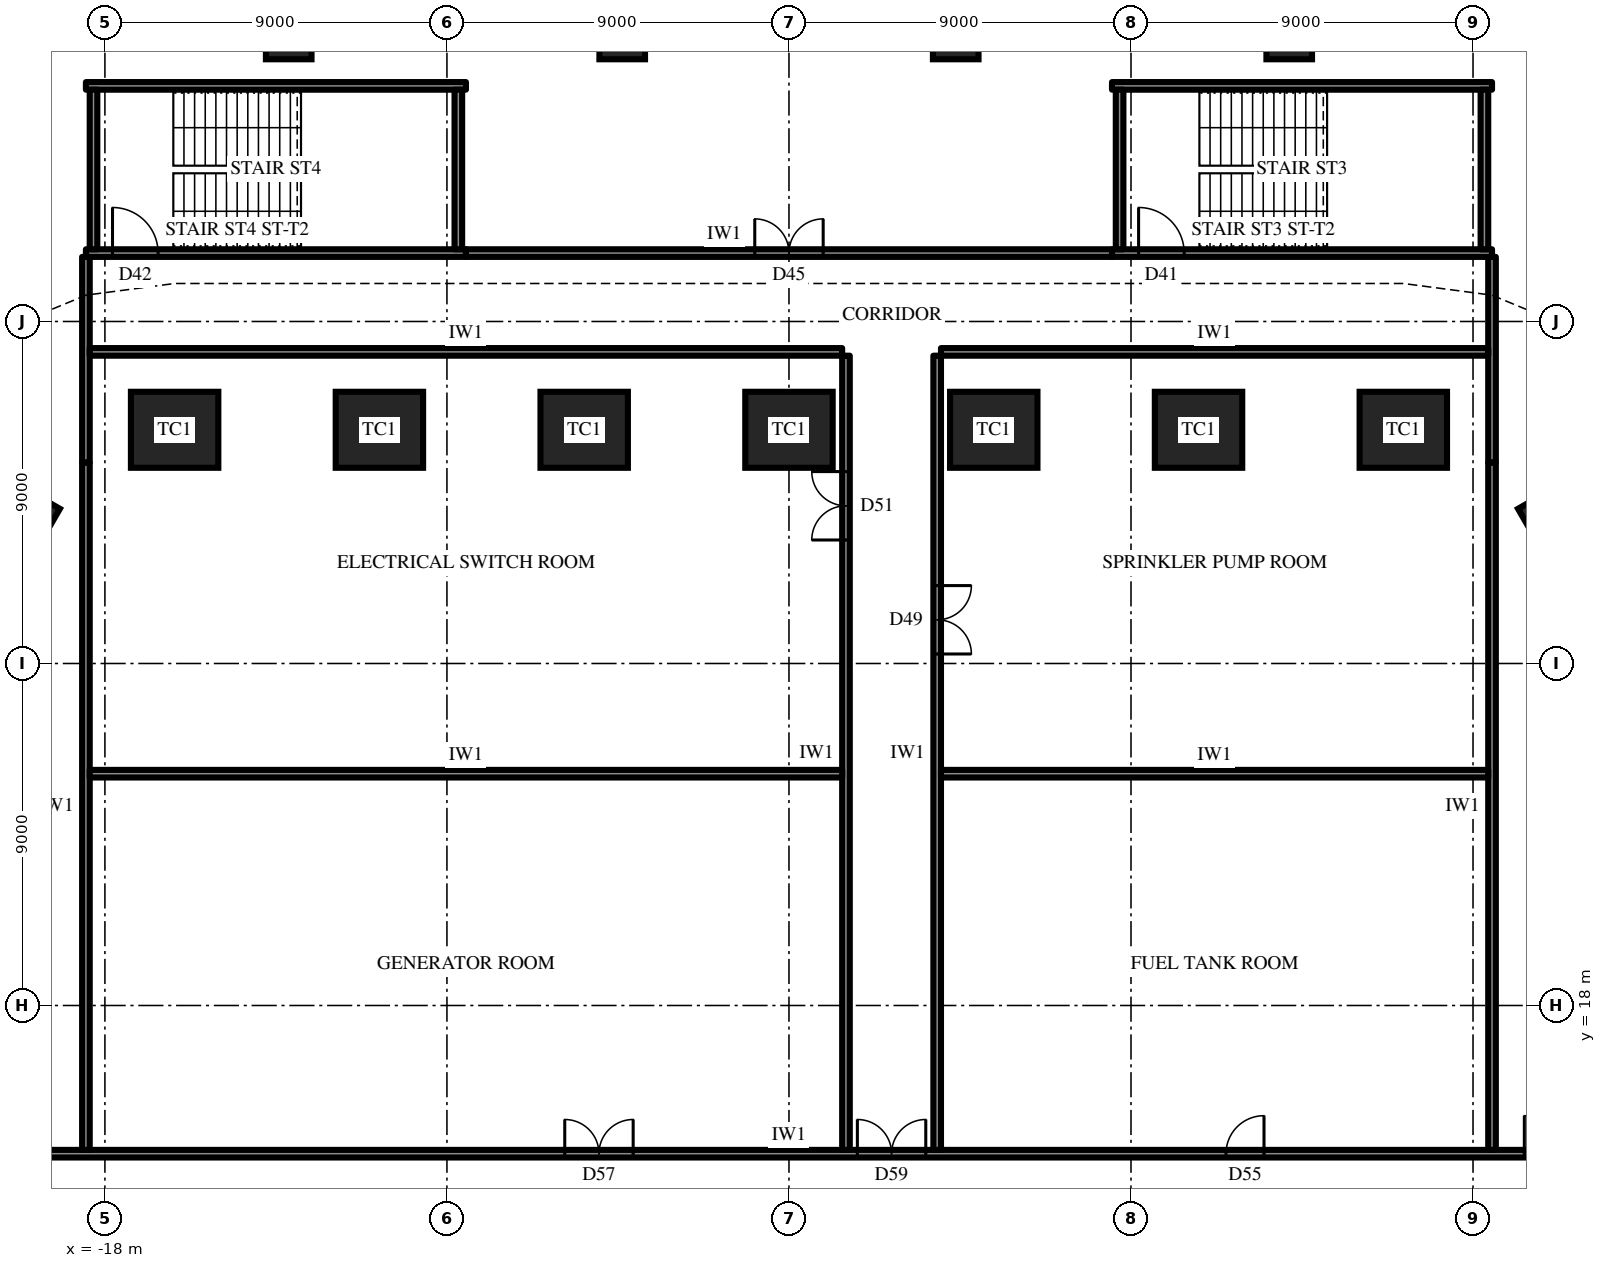
"""IFC4 building model, lengths in metres.
Left out: names, types, materials, properties, quantities, classifications, styles, units other than length and angle.
Written with IfcOpenShell. Run it as: python <this file> out.ifc"""

import sys

from ifc_helpers import new_model, si_unit, direction, frame, frame_2d, origin, origin_2d, place, context, subcontext, project, spatial, rectangle, extrude, element, fill, save


model = new_model("IFC4")
c1 = context("Model", 3, precision=1e-05, world=origin(), true_north=direction((0.0, 1.0)))
c2 = subcontext(c1, "Body", "Model", "MODEL_VIEW")
j1 = project(units=[si_unit("LENGTHUNIT", "METRE"), si_unit("PLANEANGLEUNIT", "RADIAN")], contexts=[c1])
p1 = place(None, origin())
s1 = spatial("IfcSite", under=j1, at=p1, CompositionType="ELEMENT")
p2 = place(p1, origin())
s2 = spatial("IfcBuilding", under=s1, at=p2, CompositionType="ELEMENT")
p3 = place(p2, frame((0.0, 0.0, -9.0)))
s3 = spatial("IfcBuildingStorey", under=s2, at=p3, CompositionType="ELEMENT", Elevation=-9.0)
for number, where, z_axis, x_axis in (
    (1, (20.626, 30.575, 0.0), (0.0, 0.0, 1.0), (-0.5, 0.866, 0.0)),
    (2, (16.166, 33.15, 0.0), (0.0, 0.0, 1.0), (-1.0, 0.0, 0.0)),
    (3, (10.777, 33.15, 0.0), (0.0, 0.0, 1.0), (-1.0, 0.0, 0.0)),
    (4, (5.389, 33.15, 0.0), (0.0, 0.0, 1.0), (-1.0, 0.0, 0.0)),
    (5, (0.0, 33.15, 0.0), (0.0, 0.0, 1.0), (-1.0, 0.0, 0.0)),
    (6, (-5.389, 33.15, 0.0), (0.0, 0.0, 1.0), (-1.0, 0.0, 0.0)),
    (7, (-10.777, 33.15, 0.0), (0.0, 0.0, 1.0), (-1.0, 0.0, 0.0)),
    (8, (-16.166, 33.15, 0.0), (0.0, 0.0, 1.0), (-1.0, 0.0, 0.0)),
    (9, (-20.626, 30.575, 0.0), (0.0, 0.0, 1.0), (-0.5, -0.866, 0.0)),
):
    element("IfcColumn", number, at=place(p3, frame(where, z_axis=z_axis, x_axis=x_axis)), inside=s3, PredefinedType="COLUMN", context=c2, shape_type="SweptSolid", body=[
        extrude(rectangle(XDim=2.3, YDim=2.0, at=origin_2d()), origin(), (0.0, 0.0, 1.0), 4.5),
    ])
p4 = place(p3, frame((8.5, 37.8, 0.0), z_axis=(0.0, 0.0, 1.0), x_axis=(1.0, 0.0, 0.0)))
e10 = element("IfcWall", 10, at=p4, inside=s3, PredefinedType="SHEAR", context=c2, shape_type="SweptSolid", body=[
    extrude(rectangle(XDim=10.0, YDim=0.2, at=frame_2d((5.0, 0.0))), origin(), (0.0, 0.0, 1.0), 4.5),
])
p5 = place(p4, frame((0.7, 0.0, 0.0)))
e11 = element("IfcOpeningElement", 11, at=p5, cuts=e10, PredefinedType="OPENING", context=c2, shape_type="SweptSolid", body=[
    extrude(rectangle(XDim=1.2, YDim=2.2, at=frame_2d((0.6, 1.1))), frame((0.0, 0.11, 0.0), z_axis=(0.0, -1.0, 0.0), x_axis=(1.0, 0.0, 0.0)), (0.0, 0.0, 1.0), 0.22),
])
p6 = place(p3, frame((18.5, 42.2, 0.0), z_axis=(0.0, 0.0, 1.0), x_axis=(-1.0, 0.0, 0.0)))
e12 = element("IfcWall", 12, at=p6, inside=s3, PredefinedType="SHEAR", context=c2, shape_type="SweptSolid", body=[
    extrude(rectangle(XDim=10.0, YDim=0.2, at=frame_2d((5.0, 0.0))), origin(), (0.0, 0.0, 1.0), 4.5),
])
for number, where, z_axis, x_axis in (
    (13, (8.7, 42.1, 0.0), (0.0, 0.0, 1.0), (0.0, -1.0, 0.0)),
    (14, (18.3, 37.9, 0.0), (0.0, 0.0, 1.0), (0.0, 1.0, 0.0)),
):
    element("IfcWall", number, at=place(p3, frame(where, z_axis=z_axis, x_axis=x_axis)), inside=s3, PredefinedType="SHEAR", context=c2, shape_type="SweptSolid", body=[
        extrude(rectangle(XDim=4.2, YDim=0.2, at=frame_2d((2.1, 0.0))), origin(), (0.0, 0.0, 1.0), 4.5),
    ])
p7 = place(p3, frame((-18.5, 37.8, 0.0), z_axis=(0.0, 0.0, 1.0), x_axis=(1.0, 0.0, 0.0)))
e15 = element("IfcWall", 15, at=p7, inside=s3, PredefinedType="SHEAR", context=c2, shape_type="SweptSolid", body=[
    extrude(rectangle(XDim=10.0, YDim=0.2, at=frame_2d((5.0, 0.0))), origin(), (0.0, 0.0, 1.0), 4.5),
])
p8 = place(p7, frame((0.7, 0.0, 0.0)))
e16 = element("IfcOpeningElement", 16, at=p8, cuts=e15, PredefinedType="OPENING", context=c2, shape_type="SweptSolid", body=[
    extrude(rectangle(XDim=1.2, YDim=2.2, at=frame_2d((0.6, 1.1))), frame((0.0, 0.11, 0.0), z_axis=(0.0, -1.0, 0.0), x_axis=(1.0, 0.0, 0.0)), (0.0, 0.0, 1.0), 0.22),
])
p9 = place(p3, frame((-8.5, 42.2, 0.0), z_axis=(0.0, 0.0, 1.0), x_axis=(-1.0, 0.0, 0.0)))
e17 = element("IfcWall", 17, at=p9, inside=s3, PredefinedType="SHEAR", context=c2, shape_type="SweptSolid", body=[
    extrude(rectangle(XDim=10.0, YDim=0.2, at=frame_2d((5.0, 0.0))), origin(), (0.0, 0.0, 1.0), 4.5),
])
for number, where, z_axis, x_axis in (
    (18, (-18.3, 42.1, 0.0), (0.0, 0.0, 1.0), (0.0, -1.0, 0.0)),
    (19, (-8.7, 37.9, 0.0), (0.0, 0.0, 1.0), (0.0, 1.0, 0.0)),
):
    element("IfcWall", number, at=place(p3, frame(where, z_axis=z_axis, x_axis=x_axis)), inside=s3, PredefinedType="SHEAR", context=c2, shape_type="SweptSolid", body=[
        extrude(rectangle(XDim=4.2, YDim=0.2, at=frame_2d((2.1, 0.0))), origin(), (0.0, 0.0, 1.0), 4.5),
    ])
for number, where, z_axis, x_axis in (
    (20, (13.164, 43.5, 0.0), (0.0, 0.0, 1.0), (-1.0, 0.0, 0.0)),
    (21, (4.388, 43.5, 0.0), (0.0, 0.0, 1.0), (-1.0, 0.0, 0.0)),
    (22, (-4.388, 43.5, 0.0), (0.0, 0.0, 1.0), (-1.0, 0.0, 0.0)),
    (23, (-13.164, 43.5, 0.0), (0.0, 0.0, 1.0), (-1.0, 0.0, 0.0)),
):
    element("IfcColumn", number, at=place(p3, frame(where, z_axis=z_axis, x_axis=x_axis)), inside=s3, PredefinedType="COLUMN", context=c2, shape_type="SweptSolid", body=[
        extrude(rectangle(XDim=1.2, YDim=1.2, at=origin_2d()), origin(), (0.0, 0.0, 1.0), 4.5),
    ])
p10 = place(p3, frame((-44.283, 14.1, 0.0), z_axis=(0.0, 0.0, 1.0), x_axis=(1.0, 0.0, 0.0)))
e24 = element("IfcWall", 24, at=p10, inside=s3, PredefinedType="PARTITIONING", context=c2, shape_type="SweptSolid", body=[
    extrude(rectangle(XDim=88.565, YDim=0.2, at=frame_2d((44.283, 0.0))), origin(), (0.0, 0.0, 1.0), 4.15),
])
p11 = place(p10, frame((38.383, 0.0, 0.0)))
e25 = element("IfcOpeningElement", 25, at=p11, cuts=e24, PredefinedType="OPENING", context=c2, shape_type="SweptSolid", body=[
    extrude(rectangle(XDim=1.8, YDim=2.4, at=frame_2d((0.9, 1.2))), frame((0.0, 0.11, 0.0), z_axis=(0.0, -1.0, 0.0), x_axis=(1.0, 0.0, 0.0)), (0.0, 0.0, 1.0), 0.22),
])
p12 = place(p10, frame((55.783, 0.0, 0.0)))
e26 = element("IfcOpeningElement", 26, at=p12, cuts=e24, PredefinedType="OPENING", context=c2, shape_type="SweptSolid", body=[
    extrude(rectangle(XDim=1.0, YDim=2.2, at=frame_2d((0.5, 1.1))), frame((0.0, 0.11, 0.0), z_axis=(0.0, -1.0, 0.0), x_axis=(1.0, 0.0, 0.0)), (0.0, 0.0, 1.0), 0.22),
])
p13 = place(p10, frame((46.083, 0.0, 0.0)))
e27 = element("IfcOpeningElement", 27, at=p13, cuts=e24, PredefinedType="OPENING", context=c2, shape_type="SweptSolid", body=[
    extrude(rectangle(XDim=1.8, YDim=2.4, at=frame_2d((0.9, 1.2))), frame((0.0, 0.11, 0.0), z_axis=(0.0, -1.0, 0.0), x_axis=(1.0, 0.0, 0.0)), (0.0, 0.0, 1.0), 0.22),
])
p14 = place(p10, frame((63.633, 0.0, 0.0)))
e28 = element("IfcOpeningElement", 28, at=p14, cuts=e24, PredefinedType="OPENING", context=c2, shape_type="SweptSolid", body=[
    extrude(rectangle(XDim=1.0, YDim=2.2, at=frame_2d((0.5, 1.1))), frame((0.0, 0.11, 0.0), z_axis=(0.0, -1.0, 0.0), x_axis=(1.0, 0.0, 0.0)), (0.0, 0.0, 1.0), 0.22),
])
p15 = place(p3, frame((-18.5, 14.2, 0.0), z_axis=(0.0, 0.0, 1.0), x_axis=(0.0, 1.0, 0.0)))
e29 = element("IfcWall", 29, at=p15, inside=s3, PredefinedType="PARTITIONING", context=c2, shape_type="SweptSolid", body=[
    extrude(rectangle(XDim=18.09, YDim=0.2, at=frame_2d((9.045, 0.0))), origin(), (0.0, 0.0, 1.0), 3.094),
])
p16 = place(p3, frame((-18.5, 32.29, 0.0), z_axis=(0.0, 0.0, 1.0), x_axis=(0.0, 1.0, 0.0)))
e30 = element("IfcWall", 30, at=p16, inside=s3, PredefinedType="PARTITIONING", context=c2, shape_type="SweptSolid", body=[
    extrude(rectangle(XDim=5.41, YDim=0.2, at=frame_2d((2.705, 0.0))), origin(), (0.0, 0.0, 1.0), 4.15),
])
p17 = place(p3, frame((18.5, 14.2, 0.0), z_axis=(0.0, 0.0, 1.0), x_axis=(0.0, 1.0, 0.0)))
e31 = element("IfcWall", 31, at=p17, inside=s3, PredefinedType="PARTITIONING", context=c2, shape_type="SweptSolid", body=[
    extrude(rectangle(XDim=18.09, YDim=0.2, at=frame_2d((9.045, 0.0))), origin(), (0.0, 0.0, 1.0), 3.094),
])
p18 = place(p3, frame((18.5, 32.29, 0.0), z_axis=(0.0, 0.0, 1.0), x_axis=(0.0, 1.0, 0.0)))
e32 = element("IfcWall", 32, at=p18, inside=s3, PredefinedType="PARTITIONING", context=c2, shape_type="SweptSolid", body=[
    extrude(rectangle(XDim=5.41, YDim=0.2, at=frame_2d((2.705, 0.0))), origin(), (0.0, 0.0, 1.0), 4.15),
])
p19 = place(p3, frame((1.5, 14.2, 0.0), z_axis=(0.0, 0.0, 1.0), x_axis=(0.0, 1.0, 0.0)))
e33 = element("IfcWall", 33, at=p19, inside=s3, PredefinedType="PARTITIONING", context=c2, shape_type="SweptSolid", body=[
    extrude(rectangle(XDim=20.9, YDim=0.2, at=frame_2d((10.45, 0.0))), origin(), (0.0, 0.0, 1.0), 4.15),
])
p20 = place(p19, frame((16.05, 0.0, 0.0)))
e34 = element("IfcOpeningElement", 34, at=p20, cuts=e33, PredefinedType="OPENING", context=c2, shape_type="SweptSolid", body=[
    extrude(rectangle(XDim=1.8, YDim=2.4, at=frame_2d((0.9, 1.2))), frame((0.0, 0.11, 0.0), z_axis=(0.0, -1.0, 0.0), x_axis=(1.0, 0.0, 0.0)), (0.0, 0.0, 1.0), 0.22),
])
p21 = place(p3, frame((3.9, 14.2, 0.0), z_axis=(0.0, 0.0, 1.0), x_axis=(0.0, 1.0, 0.0)))
e35 = element("IfcWall", 35, at=p21, inside=s3, PredefinedType="PARTITIONING", context=c2, shape_type="SweptSolid", body=[
    extrude(rectangle(XDim=20.9, YDim=0.2, at=frame_2d((10.45, 0.0))), origin(), (0.0, 0.0, 1.0), 4.15),
])
p22 = place(p21, frame((13.05, 0.0, 0.0)))
e36 = element("IfcOpeningElement", 36, at=p22, cuts=e35, PredefinedType="OPENING", context=c2, shape_type="SweptSolid", body=[
    extrude(rectangle(XDim=1.8, YDim=2.4, at=frame_2d((0.9, 1.2))), frame((0.0, 0.11, 0.0), z_axis=(0.0, -1.0, 0.0), x_axis=(1.0, 0.0, 0.0)), (0.0, 0.0, 1.0), 0.22),
])
p23 = place(p3, frame((-18.4, 24.1, 0.0), z_axis=(0.0, 0.0, 1.0), x_axis=(1.0, 0.0, 0.0)))
e37 = element("IfcWall", 37, at=p23, inside=s3, PredefinedType="PARTITIONING", context=c2, shape_type="SweptSolid", body=[
    extrude(rectangle(XDim=19.8, YDim=0.2, at=frame_2d((9.9, 0.0))), origin(), (0.0, 0.0, 1.0), 4.15),
])
p24 = place(p3, frame((4.0, 24.1, 0.0), z_axis=(0.0, 0.0, 1.0), x_axis=(1.0, 0.0, 0.0)))
e38 = element("IfcWall", 38, at=p24, inside=s3, PredefinedType="PARTITIONING", context=c2, shape_type="SweptSolid", body=[
    extrude(rectangle(XDim=14.4, YDim=0.2, at=frame_2d((7.2, 0.0))), origin(), (0.0, 0.0, 1.0), 4.15),
])
p25 = place(p3, frame((-18.4, 35.2, 0.0), z_axis=(0.0, 0.0, 1.0), x_axis=(1.0, 0.0, 0.0)))
e39 = element("IfcWall", 39, at=p25, inside=s3, PredefinedType="PARTITIONING", context=c2, shape_type="SweptSolid", body=[
    extrude(rectangle(XDim=19.8, YDim=0.2, at=frame_2d((9.9, 0.0))), origin(), (0.0, 0.0, 1.0), 4.15),
])
p26 = place(p3, frame((4.0, 35.2, 0.0), z_axis=(0.0, 0.0, 1.0), x_axis=(1.0, 0.0, 0.0)))
e40 = element("IfcWall", 40, at=p26, inside=s3, PredefinedType="PARTITIONING", context=c2, shape_type="SweptSolid", body=[
    extrude(rectangle(XDim=14.4, YDim=0.2, at=frame_2d((7.2, 0.0))), origin(), (0.0, 0.0, 1.0), 4.15),
])
p27 = place(p3, frame((-8.5, 37.8, 0.0), z_axis=(0.0, 0.0, 1.0), x_axis=(1.0, 0.0, 0.0)))
e41 = element("IfcWall", 41, at=p27, inside=s3, PredefinedType="PARTITIONING", context=c2, shape_type="SweptSolid", body=[
    extrude(rectangle(XDim=17.0, YDim=0.2, at=frame_2d((8.5, 0.0))), origin(), (0.0, 0.0, 1.0), 4.15),
])
p28 = place(p27, frame((7.6, 0.0, 0.0)))
e42 = element("IfcOpeningElement", 42, at=p28, cuts=e41, PredefinedType="OPENING", context=c2, shape_type="SweptSolid", body=[
    extrude(rectangle(XDim=1.8, YDim=2.4, at=frame_2d((0.9, 1.2))), frame((0.0, 0.11, 0.0), z_axis=(0.0, -1.0, 0.0), x_axis=(1.0, 0.0, 0.0)), (0.0, 0.0, 1.0), 0.22),
])
p29 = place(p11, origin())
e43 = element("IfcDoor", 43, at=p29, inside=s3, OperationType="DOUBLE_DOOR_SINGLE_SWING", PredefinedType="DOOR", context=c2, shape_type="SweptSolid", body=[
    extrude(rectangle(XDim=1.8, YDim=2.4, at=frame_2d((0.9, 1.2))), frame((0.0, 0.025, 0.0), z_axis=(0.0, -1.0, 0.0), x_axis=(1.0, 0.0, 0.0)), (0.0, 0.0, 1.0), 0.05),
])
fill(e25, e43)
p30 = place(p12, origin())
e44 = element("IfcDoor", 44, at=p30, inside=s3, OperationType="SINGLE_SWING_LEFT", PredefinedType="DOOR", context=c2, shape_type="SweptSolid", body=[
    extrude(rectangle(XDim=1.0, YDim=2.2, at=frame_2d((0.5, 1.1))), frame((0.0, 0.025, 0.0), z_axis=(0.0, -1.0, 0.0), x_axis=(1.0, 0.0, 0.0)), (0.0, 0.0, 1.0), 0.05),
])
fill(e26, e44)
p31 = place(p13, origin())
e45 = element("IfcDoor", 45, at=p31, inside=s3, OperationType="DOUBLE_DOOR_SINGLE_SWING", PredefinedType="DOOR", context=c2, shape_type="SweptSolid", body=[
    extrude(rectangle(XDim=1.8, YDim=2.4, at=frame_2d((0.9, 1.2))), frame((0.0, 0.025, 0.0), z_axis=(0.0, -1.0, 0.0), x_axis=(1.0, 0.0, 0.0)), (0.0, 0.0, 1.0), 0.05),
])
fill(e27, e45)
p32 = place(p20, origin())
e46 = element("IfcDoor", 46, at=p32, inside=s3, OperationType="DOUBLE_DOOR_SINGLE_SWING", PredefinedType="DOOR", context=c2, shape_type="SweptSolid", body=[
    extrude(rectangle(XDim=1.8, YDim=2.4, at=frame_2d((0.9, 1.2))), frame((0.0, 0.025, 0.0), z_axis=(0.0, -1.0, 0.0), x_axis=(1.0, 0.0, 0.0)), (0.0, 0.0, 1.0), 0.05),
])
fill(e34, e46)
p33 = place(p22, frame((1.8, 0.0, 0.0), z_axis=(0.0, 0.0, 1.0), x_axis=(-1.0, 0.0, 0.0)))
e47 = element("IfcDoor", 47, at=p33, inside=s3, OperationType="DOUBLE_DOOR_SINGLE_SWING", PredefinedType="DOOR", context=c2, shape_type="SweptSolid", body=[
    extrude(rectangle(XDim=1.8, YDim=2.4, at=frame_2d((0.9, 1.2))), frame((0.0, 0.025, 0.0), z_axis=(0.0, -1.0, 0.0), x_axis=(1.0, 0.0, 0.0)), (0.0, 0.0, 1.0), 0.05),
])
fill(e36, e47)
p34 = place(p28, origin())
e48 = element("IfcDoor", 48, at=p34, inside=s3, OperationType="DOUBLE_DOOR_SINGLE_SWING", PredefinedType="DOOR", context=c2, shape_type="SweptSolid", body=[
    extrude(rectangle(XDim=1.8, YDim=2.4, at=frame_2d((0.9, 1.2))), frame((0.0, 0.025, 0.0), z_axis=(0.0, -1.0, 0.0), x_axis=(1.0, 0.0, 0.0)), (0.0, 0.0, 1.0), 0.05),
])
fill(e42, e48)
p35 = place(p14, origin())
e49 = element("IfcDoor", 49, at=p35, inside=s3, OperationType="SINGLE_SWING_RIGHT", PredefinedType="DOOR", context=c2, shape_type="SweptSolid", body=[
    extrude(rectangle(XDim=1.0, YDim=2.2, at=frame_2d((0.5, 1.1))), frame((0.0, 0.025, 0.0), z_axis=(0.0, -1.0, 0.0), x_axis=(1.0, 0.0, 0.0)), (0.0, 0.0, 1.0), 0.05),
])
fill(e28, e49)
p36 = place(p5, origin())
e50 = element("IfcDoor", 50, at=p36, inside=s3, OperationType="SINGLE_SWING_RIGHT", PredefinedType="DOOR", context=c2, shape_type="SweptSolid", body=[
    extrude(rectangle(XDim=1.2, YDim=2.2, at=frame_2d((0.6, 1.1))), frame((0.0, 0.025, 0.0), z_axis=(0.0, -1.0, 0.0), x_axis=(1.0, 0.0, 0.0)), (0.0, 0.0, 1.0), 0.05),
])
fill(e11, e50)
p37 = place(p8, origin())
e51 = element("IfcDoor", 51, at=p37, inside=s3, OperationType="SINGLE_SWING_RIGHT", PredefinedType="DOOR", context=c2, shape_type="SweptSolid", body=[
    extrude(rectangle(XDim=1.2, YDim=2.2, at=frame_2d((0.6, 1.1))), frame((0.0, 0.025, 0.0), z_axis=(0.0, -1.0, 0.0), x_axis=(1.0, 0.0, 0.0)), (0.0, 0.0, 1.0), 0.05),
])
fill(e16, e51)
save(model, sys.argv[1])
